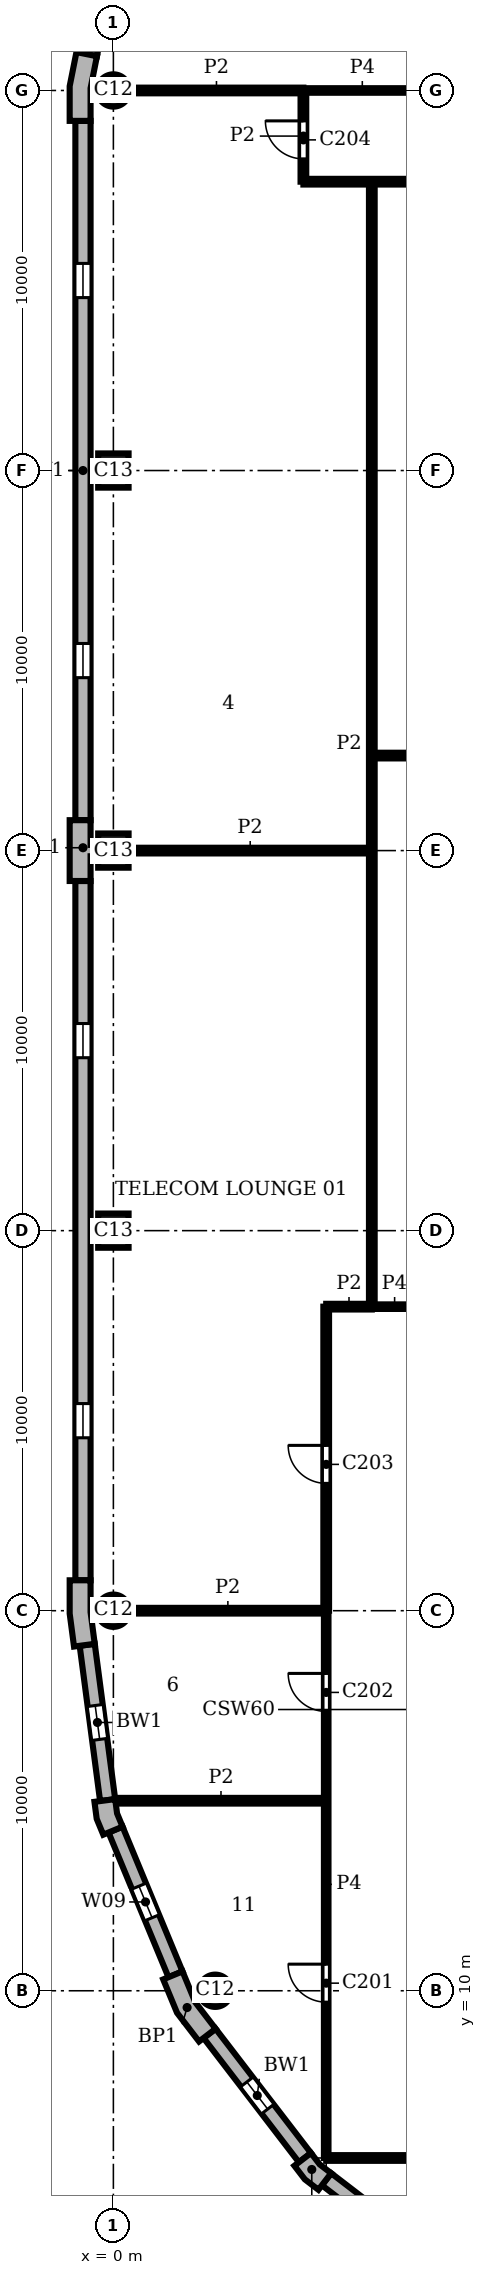
"""IFC4 building model, lengths in metres.
Left out: names, types, materials, properties, quantities, classifications, styles, units other than length and angle.
Written with IfcOpenShell. Run it as: python <this file> out.ifc"""

import sys

from ifc_helpers import new_model, si_unit, direction, frame, frame_2d, origin, origin_2d, place, context, subcontext, project, spatial, polyline, rectangle, circle, outline, extrude, element, fill, save


model = new_model("IFC4")
c1 = context("Model", 3, precision=1e-05, world=origin(), true_north=direction((0.0, 1.0)))
c2 = subcontext(c1, "Body", "Model", "MODEL_VIEW")
j1 = project(units=[si_unit("LENGTHUNIT", "METRE"), si_unit("PLANEANGLEUNIT", "RADIAN")], contexts=[c1])
p1 = place(None, origin())
s1 = spatial("IfcSite", under=j1, at=p1, CompositionType="ELEMENT")
p2 = place(p1, origin())
s2 = spatial("IfcBuilding", under=s1, at=p2, CompositionType="ELEMENT")
p3 = place(p2, frame((0.0, 0.0, 263.1)))
s3 = spatial("IfcBuildingStorey", under=s2, at=p3, CompositionType="ELEMENT", Elevation=263.1)
p4 = place(p3, frame((0.0, 60.0, 0.0), z_axis=(0.0, 0.0, 1.0), x_axis=(1.0, 0.0, 0.0)))
e1 = element("IfcColumn", 1, at=p4, inside=s3, PredefinedType="COLUMN", context=c2, shape_type="SweptSolid", body=[
    extrude(circle(Radius=0.425, at=origin_2d()), origin(), (0.0, 0.0, 1.0), 3.9),
])
for number, where, z_axis, x_axis in (
    (2, (0.0, 50.0, 0.0), (0.0, 0.0, 1.0), (0.0, 1.0, 0.0)),
    (3, (0.0, 40.0, 0.0), (0.0, 0.0, 1.0), (0.0, 1.0, 0.0)),
    (4, (0.0, 30.0, 0.0), (0.0, 0.0, 1.0), (0.0, 1.0, 0.0)),
):
    element("IfcColumn", number, at=place(p3, frame(where, z_axis=z_axis, x_axis=x_axis)), inside=s3, PredefinedType="COLUMN", context=c2, shape_type="SweptSolid", body=[
        extrude(rectangle(XDim=0.9, YDim=0.8, at=origin_2d()), origin(), (0.0, 0.0, 1.0), 3.9),
    ])
for number, where, z_axis, x_axis in (
    (5, (0.0, 20.0, 0.0), (0.0, 0.0, 1.0), (1.0, 0.0, 0.0)),
    (6, (2.679, 10.0, 0.0), (0.0, 0.0, 1.0), (1.0, 0.0, 0.0)),
):
    element("IfcColumn", number, at=place(p3, frame(where, z_axis=z_axis, x_axis=x_axis)), inside=s3, PredefinedType="COLUMN", context=c2, shape_type="SweptSolid", body=[
        extrude(circle(Radius=0.425, at=origin_2d()), origin(), (0.0, 0.0, 1.0), 3.9),
    ])
p5 = place(p3, origin())
e7 = element("IfcWall", 7, at=p5, inside=s3, PredefinedType="SOLIDWALL", context=c2, shape_type="SweptSolid", body=[
    extrude(outline(polyline([(-0.825, 60.98), (-0.972, 61.009), (-1.15, 60.113), (-1.15, 59.2), (-1.0, 59.2), (-0.6, 59.2), (-0.6, 60.059), (-0.432, 60.902), (-0.825, 60.98)])), origin(), (0.0, 0.0, 1.0), 3.9),
])
e8 = element("IfcWall", 8, at=p5, inside=s3, PredefinedType="SOLIDWALL", context=c2, shape_type="SweptSolid", body=[
    extrude(outline(polyline([(-0.6, 39.2), (-0.6, 39.85), (-0.45, 39.85), (-0.45, 40.15), (-0.6, 40.15), (-0.6, 40.8), (-1.0, 40.8), (-1.15, 40.8), (-1.15, 40.0), (-1.15, 39.2), (-1.0, 39.2), (-0.6, 39.2)])), origin(), (0.0, 0.0, 1.0), 3.9),
])
e9 = element("IfcWall", 9, at=p5, inside=s3, PredefinedType="SOLIDWALL", context=c2, shape_type="SweptSolid", body=[
    extrude(outline(polyline([(-1.0, 20.8), (-1.15, 20.8), (-1.15, 19.925), (-1.036, 19.057), (-0.887, 19.076), (-0.49, 19.128), (-0.6, 19.961), (-0.6, 20.8), (-1.0, 20.8)])), origin(), (0.0, 0.0, 1.0), 3.9),
])
e10 = element("IfcWall", 10, at=p5, inside=s3, PredefinedType="SOLIDWALL", context=c2, shape_type="SweptSolid", body=[
    extrude(outline(polyline([(-0.349, 14.99), (-0.498, 14.971), (-0.439, 14.523), (-0.266, 14.106), (-0.128, 14.164), (0.242, 14.317), (0.097, 14.667), (0.047, 15.043), (-0.349, 14.99)])), origin(), (0.0, 0.0, 1.0), 3.9),
])
e11 = element("IfcWall", 11, at=p5, inside=s3, PredefinedType="SOLIDWALL", context=c2, shape_type="SweptSolid", body=[
    extrude(outline(polyline([(1.449, 10.356), (1.311, 10.299), (1.675, 9.42), (2.254, 8.665), (2.373, 8.757), (2.69, 9.0), (2.155, 9.698), (1.819, 10.51), (1.449, 10.356)])), origin(), (0.0, 0.0, 1.0), 3.9),
])
e12 = element("IfcWall", 12, at=p5, inside=s3, PredefinedType="SOLIDWALL", context=c2, shape_type="SweptSolid", body=[
    extrude(outline(polyline([(4.882, 5.487), (4.763, 5.396), (5.038, 5.038), (5.396, 4.763), (5.487, 4.882), (5.731, 5.199), (5.43, 5.43), (5.199, 5.731), (4.882, 5.487)])), origin(), (0.0, 0.0, 1.0), 3.9),
])
p6 = place(p3, frame((0.299, 65.602, 0.0), z_axis=(0.0, 0.0, 1.0), x_axis=(-0.195098533057, -0.98078364709, 0.0)))
e13 = element("IfcWall", 13, at=p6, inside=s3, PredefinedType="SOLIDWALL", context=c2, shape_type="SweptSolid", body=[
    extrude(rectangle(XDim=4.753, YDim=0.4, at=frame_2d((2.376, 0.0))), origin(), (0.0, 0.0, 1.0), 3.9),
])
p7 = place(p6, frame((0.226, 0.0, 0.9)))
e14 = element("IfcOpeningElement", 14, at=p7, cuts=e13, PredefinedType="OPENING", context=c2, shape_type="SweptSolid", body=[
    extrude(rectangle(XDim=4.3, YDim=2.35, at=frame_2d((2.15, 1.175))), frame((0.0, 0.21, 0.0), z_axis=(0.0, -1.0, 0.0), x_axis=(1.0, 0.0, 0.0)), (0.0, 0.0, 1.0), 0.42),
])
p8 = place(p3, frame((-0.8, 59.2, 0.0), z_axis=(0.0, 0.0, 1.0), x_axis=(0.0, -1.0, 0.0)))
e15 = element("IfcWall", 15, at=p8, inside=s3, PredefinedType="SOLIDWALL", context=c2, shape_type="SweptSolid", body=[
    extrude(rectangle(XDim=18.4, YDim=0.4, at=frame_2d((9.2, 0.0))), origin(), (0.0, 0.0, 1.0), 3.9),
])
p9 = place(p8, frame((3.75, 0.0, 0.9)))
e16 = element("IfcOpeningElement", 16, at=p9, cuts=e15, PredefinedType="OPENING", context=c2, shape_type="SweptSolid", body=[
    extrude(rectangle(XDim=0.9, YDim=2.35, at=frame_2d((0.45, 1.175))), frame((0.0, 0.21, 0.0), z_axis=(0.0, -1.0, 0.0), x_axis=(1.0, 0.0, 0.0)), (0.0, 0.0, 1.0), 0.42),
])
p10 = place(p8, frame((13.75, 0.0, 0.9)))
e17 = element("IfcOpeningElement", 17, at=p10, cuts=e15, PredefinedType="OPENING", context=c2, shape_type="SweptSolid", body=[
    extrude(rectangle(XDim=0.9, YDim=2.35, at=frame_2d((0.45, 1.175))), frame((0.0, 0.21, 0.0), z_axis=(0.0, -1.0, 0.0), x_axis=(1.0, 0.0, 0.0)), (0.0, 0.0, 1.0), 0.42),
])
p11 = place(p3, frame((-0.8, 39.2, 0.0), z_axis=(0.0, 0.0, 1.0), x_axis=(0.0, -1.0, 0.0)))
e18 = element("IfcWall", 18, at=p11, inside=s3, PredefinedType="SOLIDWALL", context=c2, shape_type="SweptSolid", body=[
    extrude(rectangle(XDim=18.4, YDim=0.4, at=frame_2d((9.2, 0.0))), origin(), (0.0, 0.0, 1.0), 3.9),
])
p12 = place(p11, frame((3.75, 0.0, 0.9)))
e19 = element("IfcOpeningElement", 19, at=p12, cuts=e18, PredefinedType="OPENING", context=c2, shape_type="SweptSolid", body=[
    extrude(rectangle(XDim=0.9, YDim=2.35, at=frame_2d((0.45, 1.175))), frame((0.0, 0.21, 0.0), z_axis=(0.0, -1.0, 0.0), x_axis=(1.0, 0.0, 0.0)), (0.0, 0.0, 1.0), 0.42),
])
p13 = place(p11, frame((13.75, 0.0, 0.9)))
e20 = element("IfcOpeningElement", 20, at=p13, cuts=e18, PredefinedType="OPENING", context=c2, shape_type="SweptSolid", body=[
    extrude(rectangle(XDim=0.9, YDim=2.35, at=frame_2d((0.45, 1.175))), frame((0.0, 0.21, 0.0), z_axis=(0.0, -1.0, 0.0), x_axis=(1.0, 0.0, 0.0)), (0.0, 0.0, 1.0), 0.42),
])
p14 = place(p3, frame((-0.689, 19.102, 0.0), z_axis=(0.0, 0.0, 1.0), x_axis=(0.130514280502, -0.991446429508, 0.0)))
e21 = element("IfcWall", 21, at=p14, inside=s3, PredefinedType="SOLIDWALL", context=c2, shape_type="SweptSolid", body=[
    extrude(rectangle(XDim=4.121, YDim=0.4, at=frame_2d((2.061, 0.0))), origin(), (0.0, 0.0, 1.0), 3.9),
])
p15 = place(p14, frame((1.611, 0.0, 0.9)))
e22 = element("IfcOpeningElement", 22, at=p15, cuts=e21, PredefinedType="OPENING", context=c2, shape_type="SweptSolid", body=[
    extrude(rectangle(XDim=0.9, YDim=2.35, at=frame_2d((0.45, 1.175))), frame((0.0, 0.21, 0.0), z_axis=(0.0, -1.0, 0.0), x_axis=(1.0, 0.0, 0.0)), (0.0, 0.0, 1.0), 0.42),
])
p16 = place(p3, frame((0.057, 14.24, 0.0), z_axis=(0.0, 0.0, 1.0), x_axis=(0.382721546029, -0.923863744394, 0.0)))
e23 = element("IfcWall", 23, at=p16, inside=s3, PredefinedType="SOLIDWALL", context=c2, shape_type="SweptSolid", body=[
    extrude(rectangle(XDim=4.121, YDim=0.4, at=frame_2d((2.061, 0.0))), origin(), (0.0, 0.0, 1.0), 3.9),
])
p17 = place(p16, frame((1.611, 0.0, 0.9)))
e24 = element("IfcOpeningElement", 24, at=p17, cuts=e23, PredefinedType="OPENING", context=c2, shape_type="SweptSolid", body=[
    extrude(rectangle(XDim=0.9, YDim=2.35, at=frame_2d((0.45, 1.175))), frame((0.0, 0.21, 0.0), z_axis=(0.0, -1.0, 0.0), x_axis=(1.0, 0.0, 0.0)), (0.0, 0.0, 1.0), 0.42),
])
p18 = place(p3, frame((2.532, 8.878, 0.0), z_axis=(0.0, 0.0, 1.0), x_axis=(0.608759824817, -0.793354571229, 0.0)))
e25 = element("IfcWall", 25, at=p18, inside=s3, PredefinedType="SOLIDWALL", context=c2, shape_type="SweptSolid", body=[
    extrude(rectangle(XDim=4.121, YDim=0.4, at=frame_2d((2.061, 0.0))), origin(), (0.0, 0.0, 1.0), 3.9),
])
p19 = place(p18, frame((1.611, 0.0, 0.9)))
e26 = element("IfcOpeningElement", 26, at=p19, cuts=e25, PredefinedType="OPENING", context=c2, shape_type="SweptSolid", body=[
    extrude(rectangle(XDim=0.9, YDim=2.35, at=frame_2d((0.45, 1.175))), frame((0.0, 0.21, 0.0), z_axis=(0.0, -1.0, 0.0), x_axis=(1.0, 0.0, 0.0)), (0.0, 0.0, 1.0), 0.42),
])
p20 = place(p3, frame((5.609, 5.041, 0.0), z_axis=(0.0, 0.0, 1.0), x_axis=(0.793354571229, -0.608759824817, 0.0)))
e27 = element("IfcWall", 27, at=p20, inside=s3, PredefinedType="SOLIDWALL", context=c2, shape_type="SweptSolid", body=[
    extrude(rectangle(XDim=4.121, YDim=0.4, at=frame_2d((2.061, 0.0))), origin(), (0.0, 0.0, 1.0), 3.9),
])
p21 = place(p20, frame((1.611, 0.0, 0.9)))
e28 = element("IfcOpeningElement", 28, at=p21, cuts=e27, PredefinedType="OPENING", context=c2, shape_type="SweptSolid", body=[
    extrude(rectangle(XDim=0.9, YDim=2.35, at=frame_2d((0.45, 1.175))), frame((0.0, 0.21, 0.0), z_axis=(0.0, -1.0, 0.0), x_axis=(1.0, 0.0, 0.0)), (0.0, 0.0, 1.0), 0.42),
])
p22 = place(p3, frame((5.0, 57.6, 0.0), z_axis=(0.0, 0.0, 1.0), x_axis=(0.0, 1.0, 0.0)))
e29 = element("IfcWall", 29, at=p22, inside=s3, PredefinedType="PARTITIONING", context=c2, shape_type="SweptSolid", body=[
    extrude(rectangle(XDim=2.4, YDim=0.15, at=frame_2d((1.2, 0.0))), origin(), (0.0, 0.0, 1.0), 3.58),
])
p23 = place(p22, frame((0.6, 0.0, 0.0)))
e30 = element("IfcOpeningElement", 30, at=p23, cuts=e29, PredefinedType="OPENING", context=c2, shape_type="SweptSolid", body=[
    extrude(rectangle(XDim=1.0, YDim=2.1, at=frame_2d((0.5, 1.05))), frame((0.0, 0.085, 0.0), z_axis=(0.0, -1.0, 0.0), x_axis=(1.0, 0.0, 0.0)), (0.0, 0.0, 1.0), 0.17),
])
p24 = place(p3, frame((5.6, 20.0, 0.0), z_axis=(0.0, 0.0, 1.0), x_axis=(0.0, 1.0, 0.0)))
e31 = element("IfcWall", 31, at=p24, inside=s3, PredefinedType="PARTITIONING", context=c2, shape_type="SweptSolid", body=[
    extrude(rectangle(XDim=8.0, YDim=0.15, at=frame_2d((4.0, 0.0))), origin(), (0.0, 0.0, 1.0), 3.58),
])
p25 = place(p24, frame((3.35, 0.0, 0.0)))
e32 = element("IfcOpeningElement", 32, at=p25, cuts=e31, PredefinedType="OPENING", context=c2, shape_type="SweptSolid", body=[
    extrude(rectangle(XDim=1.0, YDim=2.1, at=frame_2d((0.5, 1.05))), frame((0.0, 0.085, 0.0), z_axis=(0.0, -1.0, 0.0), x_axis=(1.0, 0.0, 0.0)), (0.0, 0.0, 1.0), 0.17),
])
p26 = place(p3, frame((6.8, 28.0, 0.0), z_axis=(0.0, 0.0, 1.0), x_axis=(0.0, 1.0, 0.0)))
e33 = element("IfcWall", 33, at=p26, inside=s3, PredefinedType="PARTITIONING", context=c2, shape_type="SweptSolid", body=[
    extrude(rectangle(XDim=29.6, YDim=0.15, at=frame_2d((14.8, 0.0))), origin(), (0.0, 0.0, 1.0), 3.58),
])
p27 = place(p3, frame((5.6, 5.6, 0.0), z_axis=(0.0, 0.0, 1.0), x_axis=(1.0, 0.0, 0.0)))
e34 = element("IfcWall", 34, at=p27, inside=s3, PredefinedType="PARTITIONING", context=c2, shape_type="SweptSolid", body=[
    extrude(rectangle(XDim=14.4, YDim=0.15, at=frame_2d((7.2, 0.0))), origin(), (0.0, 0.0, 1.0), 3.58),
])
p28 = place(p27, frame((4.6, 0.0, 0.0)))
e35 = element("IfcOpeningElement", 35, at=p28, cuts=e34, PredefinedType="OPENING", context=c2, shape_type="SweptSolid", body=[
    extrude(rectangle(XDim=0.8, YDim=2.1, at=frame_2d((0.4, 1.05))), frame((0.0, 0.085, 0.0), z_axis=(0.0, -1.0, 0.0), x_axis=(1.0, 0.0, 0.0)), (0.0, 0.0, 1.0), 0.17),
])
p29 = place(p27, frame((11.25, 0.0, 0.0)))
e36 = element("IfcOpeningElement", 36, at=p29, cuts=e34, PredefinedType="OPENING", context=c2, shape_type="SweptSolid", body=[
    extrude(rectangle(XDim=1.0, YDim=2.1, at=frame_2d((0.5, 1.05))), frame((0.0, 0.085, 0.0), z_axis=(0.0, -1.0, 0.0), x_axis=(1.0, 0.0, 0.0)), (0.0, 0.0, 1.0), 0.17),
])
p30 = place(p3, frame((0.063, 15.0, 0.0), z_axis=(0.0, 0.0, 1.0), x_axis=(1.0, 0.0, 0.0)))
e37 = element("IfcWall", 37, at=p30, inside=s3, PredefinedType="PARTITIONING", context=c2, shape_type="SweptSolid", body=[
    extrude(rectangle(XDim=5.537, YDim=0.15, at=frame_2d((2.769, 0.0))), origin(), (0.0, 0.0, 1.0), 3.58),
])
p31 = place(p3, frame((0.425, 20.0, 0.0), z_axis=(0.0, 0.0, 1.0), x_axis=(1.0, 0.0, 0.0)))
e38 = element("IfcWall", 38, at=p31, inside=s3, PredefinedType="PARTITIONING", context=c2, shape_type="SweptSolid", body=[
    extrude(rectangle(XDim=5.175, YDim=0.15, at=frame_2d((2.587, 0.0))), origin(), (0.0, 0.0, 1.0), 3.58),
])
p32 = place(p3, frame((5.6, 28.0, 0.0), z_axis=(0.0, 0.0, 1.0), x_axis=(1.0, 0.0, 0.0)))
e39 = element("IfcWall", 39, at=p32, inside=s3, PredefinedType="PARTITIONING", context=c2, shape_type="SweptSolid", body=[
    extrude(rectangle(XDim=1.2, YDim=0.15, at=frame_2d((0.6, 0.0))), origin(), (0.0, 0.0, 1.0), 3.58),
])
p33 = place(p3, frame((0.4, 40.0, 0.0), z_axis=(0.0, 0.0, 1.0), x_axis=(1.0, 0.0, 0.0)))
e40 = element("IfcWall", 40, at=p33, inside=s3, PredefinedType="PARTITIONING", context=c2, shape_type="SweptSolid", body=[
    extrude(rectangle(XDim=6.4, YDim=0.15, at=frame_2d((3.2, 0.0))), origin(), (0.0, 0.0, 1.0), 3.58),
])
p34 = place(p3, frame((6.8, 42.5, 0.0), z_axis=(0.0, 0.0, 1.0), x_axis=(1.0, 0.0, 0.0)))
e41 = element("IfcWall", 41, at=p34, inside=s3, PredefinedType="PARTITIONING", context=c2, shape_type="SweptSolid", body=[
    extrude(rectangle(XDim=7.0, YDim=0.15, at=frame_2d((3.5, 0.0))), origin(), (0.0, 0.0, 1.0), 3.58),
])
p35 = place(p3, frame((5.0, 57.6, 0.0), z_axis=(0.0, 0.0, 1.0), x_axis=(1.0, 0.0, 0.0)))
e42 = element("IfcWall", 42, at=p35, inside=s3, PredefinedType="PARTITIONING", context=c2, shape_type="SweptSolid", body=[
    extrude(rectangle(XDim=8.8, YDim=0.15, at=frame_2d((4.4, 0.0))), origin(), (0.0, 0.0, 1.0), 3.58),
])
p36 = place(p3, frame((0.425, 60.0, 0.0), z_axis=(0.0, 0.0, 1.0), x_axis=(1.0, 0.0, 0.0)))
e43 = element("IfcWall", 43, at=p36, inside=s3, PredefinedType="PARTITIONING", context=c2, shape_type="SweptSolid", body=[
    extrude(rectangle(XDim=4.575, YDim=0.15, at=frame_2d((2.288, 0.0))), origin(), (0.0, 0.0, 1.0), 3.58),
])
p37 = place(p3, frame((5.6, 5.6, 0.0), z_axis=(0.0, 0.0, 1.0), x_axis=(0.0, 1.0, 0.0)))
e44 = element("IfcWall", 44, at=p37, inside=s3, PredefinedType="PARTITIONING", context=c2, shape_type="SweptSolid", body=[
    extrude(rectangle(XDim=14.4, YDim=0.12, at=frame_2d((7.2, 0.0))), origin(), (0.0, 0.0, 1.0), 3.58),
])
p38 = place(p37, frame((4.1, 0.0, 0.0)))
e45 = element("IfcOpeningElement", 45, at=p38, cuts=e44, PredefinedType="OPENING", context=c2, shape_type="SweptSolid", body=[
    extrude(rectangle(XDim=1.0, YDim=2.1, at=frame_2d((0.5, 1.05))), frame((0.0, 0.07, 0.0), z_axis=(0.0, -1.0, 0.0), x_axis=(1.0, 0.0, 0.0)), (0.0, 0.0, 1.0), 0.14),
])
p39 = place(p37, frame((11.75, 0.0, 0.0)))
e46 = element("IfcOpeningElement", 46, at=p39, cuts=e44, PredefinedType="OPENING", context=c2, shape_type="SweptSolid", body=[
    extrude(rectangle(XDim=1.0, YDim=2.1, at=frame_2d((0.5, 1.05))), frame((0.0, 0.07, 0.0), z_axis=(0.0, -1.0, 0.0), x_axis=(1.0, 0.0, 0.0)), (0.0, 0.0, 1.0), 0.14),
])
p40 = place(p3, frame((6.8, 28.0, 0.0), z_axis=(0.0, 0.0, 1.0), x_axis=(1.0, 0.0, 0.0)))
e47 = element("IfcWall", 47, at=p40, inside=s3, PredefinedType="PARTITIONING", context=c2, shape_type="SweptSolid", body=[
    extrude(rectangle(XDim=1.2, YDim=0.12, at=frame_2d((0.6, 0.0))), origin(), (0.0, 0.0, 1.0), 3.58),
])
p41 = place(p3, frame((5.0, 60.0, 0.0), z_axis=(0.0, 0.0, 1.0), x_axis=(1.0, 0.0, 0.0)))
e48 = element("IfcWall", 48, at=p41, inside=s3, PredefinedType="PARTITIONING", context=c2, shape_type="SweptSolid", body=[
    extrude(rectangle(XDim=3.1, YDim=0.12, at=frame_2d((1.55, 0.0))), origin(), (0.0, 0.0, 1.0), 3.58),
])
p42 = place(p9, origin())
e49 = element("IfcWindow", 49, at=p42, inside=s3, PartitioningType="SINGLE_PANEL", PredefinedType="WINDOW", context=c2, shape_type="SweptSolid", body=[
    extrude(rectangle(XDim=0.9, YDim=2.35, at=frame_2d((0.45, 1.175))), frame((0.0, 0.16, 0.0), z_axis=(0.0, -1.0, 0.0), x_axis=(1.0, 0.0, 0.0)), (0.0, 0.0, 1.0), 0.06),
])
fill(e16, e49)
p43 = place(p10, origin())
e50 = element("IfcWindow", 50, at=p43, inside=s3, PartitioningType="SINGLE_PANEL", PredefinedType="WINDOW", context=c2, shape_type="SweptSolid", body=[
    extrude(rectangle(XDim=0.9, YDim=2.35, at=frame_2d((0.45, 1.175))), frame((0.0, 0.16, 0.0), z_axis=(0.0, -1.0, 0.0), x_axis=(1.0, 0.0, 0.0)), (0.0, 0.0, 1.0), 0.06),
])
fill(e17, e50)
p44 = place(p12, origin())
e51 = element("IfcWindow", 51, at=p44, inside=s3, PartitioningType="SINGLE_PANEL", PredefinedType="WINDOW", context=c2, shape_type="SweptSolid", body=[
    extrude(rectangle(XDim=0.9, YDim=2.35, at=frame_2d((0.45, 1.175))), frame((0.0, 0.16, 0.0), z_axis=(0.0, -1.0, 0.0), x_axis=(1.0, 0.0, 0.0)), (0.0, 0.0, 1.0), 0.06),
])
fill(e19, e51)
p45 = place(p13, origin())
e52 = element("IfcWindow", 52, at=p45, inside=s3, PartitioningType="SINGLE_PANEL", PredefinedType="WINDOW", context=c2, shape_type="SweptSolid", body=[
    extrude(rectangle(XDim=0.9, YDim=2.35, at=frame_2d((0.45, 1.175))), frame((0.0, 0.16, 0.0), z_axis=(0.0, -1.0, 0.0), x_axis=(1.0, 0.0, 0.0)), (0.0, 0.0, 1.0), 0.06),
])
fill(e20, e52)
p46 = place(p15, origin())
e53 = element("IfcWindow", 53, at=p46, inside=s3, PartitioningType="SINGLE_PANEL", PredefinedType="WINDOW", context=c2, shape_type="SweptSolid", body=[
    extrude(rectangle(XDim=0.9, YDim=2.35, at=frame_2d((0.45, 1.175))), frame((0.0, 0.16, 0.0), z_axis=(0.0, -1.0, 0.0), x_axis=(1.0, 0.0, 0.0)), (0.0, 0.0, 1.0), 0.06),
])
fill(e22, e53)
p47 = place(p17, origin())
e54 = element("IfcWindow", 54, at=p47, inside=s3, PartitioningType="SINGLE_PANEL", PredefinedType="WINDOW", context=c2, shape_type="SweptSolid", body=[
    extrude(rectangle(XDim=0.9, YDim=2.35, at=frame_2d((0.45, 1.175))), frame((0.0, 0.16, 0.0), z_axis=(0.0, -1.0, 0.0), x_axis=(1.0, 0.0, 0.0)), (0.0, 0.0, 1.0), 0.06),
])
fill(e24, e54)
p48 = place(p19, origin())
e55 = element("IfcWindow", 55, at=p48, inside=s3, PartitioningType="SINGLE_PANEL", PredefinedType="WINDOW", context=c2, shape_type="SweptSolid", body=[
    extrude(rectangle(XDim=0.9, YDim=2.35, at=frame_2d((0.45, 1.175))), frame((0.0, 0.16, 0.0), z_axis=(0.0, -1.0, 0.0), x_axis=(1.0, 0.0, 0.0)), (0.0, 0.0, 1.0), 0.06),
])
fill(e26, e55)
p49 = place(p38, origin())
e56 = element("IfcDoor", 56, at=p49, inside=s3, OperationType="SINGLE_SWING_RIGHT", PredefinedType="DOOR", context=c2, shape_type="SweptSolid", body=[
    extrude(rectangle(XDim=1.0, YDim=2.1, at=frame_2d((0.5, 1.05))), frame((0.0, 0.025, 0.0), z_axis=(0.0, -1.0, 0.0), x_axis=(1.0, 0.0, 0.0)), (0.0, 0.0, 1.0), 0.05),
])
fill(e45, e56)
p50 = place(p39, origin())
e57 = element("IfcDoor", 57, at=p50, inside=s3, OperationType="SINGLE_SWING_RIGHT", PredefinedType="DOOR", context=c2, shape_type="SweptSolid", body=[
    extrude(rectangle(XDim=1.0, YDim=2.1, at=frame_2d((0.5, 1.05))), frame((0.0, 0.025, 0.0), z_axis=(0.0, -1.0, 0.0), x_axis=(1.0, 0.0, 0.0)), (0.0, 0.0, 1.0), 0.05),
])
fill(e46, e57)
p51 = place(p25, origin())
e58 = element("IfcDoor", 58, at=p51, inside=s3, OperationType="SINGLE_SWING_RIGHT", PredefinedType="DOOR", context=c2, shape_type="SweptSolid", body=[
    extrude(rectangle(XDim=1.0, YDim=2.1, at=frame_2d((0.5, 1.05))), frame((0.0, 0.025, 0.0), z_axis=(0.0, -1.0, 0.0), x_axis=(1.0, 0.0, 0.0)), (0.0, 0.0, 1.0), 0.05),
])
fill(e32, e58)
p52 = place(p23, origin())
e59 = element("IfcDoor", 59, at=p52, inside=s3, OperationType="SINGLE_SWING_RIGHT", PredefinedType="DOOR", context=c2, shape_type="SweptSolid", body=[
    extrude(rectangle(XDim=1.0, YDim=2.1, at=frame_2d((0.5, 1.05))), frame((0.0, 0.025, 0.0), z_axis=(0.0, -1.0, 0.0), x_axis=(1.0, 0.0, 0.0)), (0.0, 0.0, 1.0), 0.05),
])
fill(e30, e59)
save(model, sys.argv[1])
